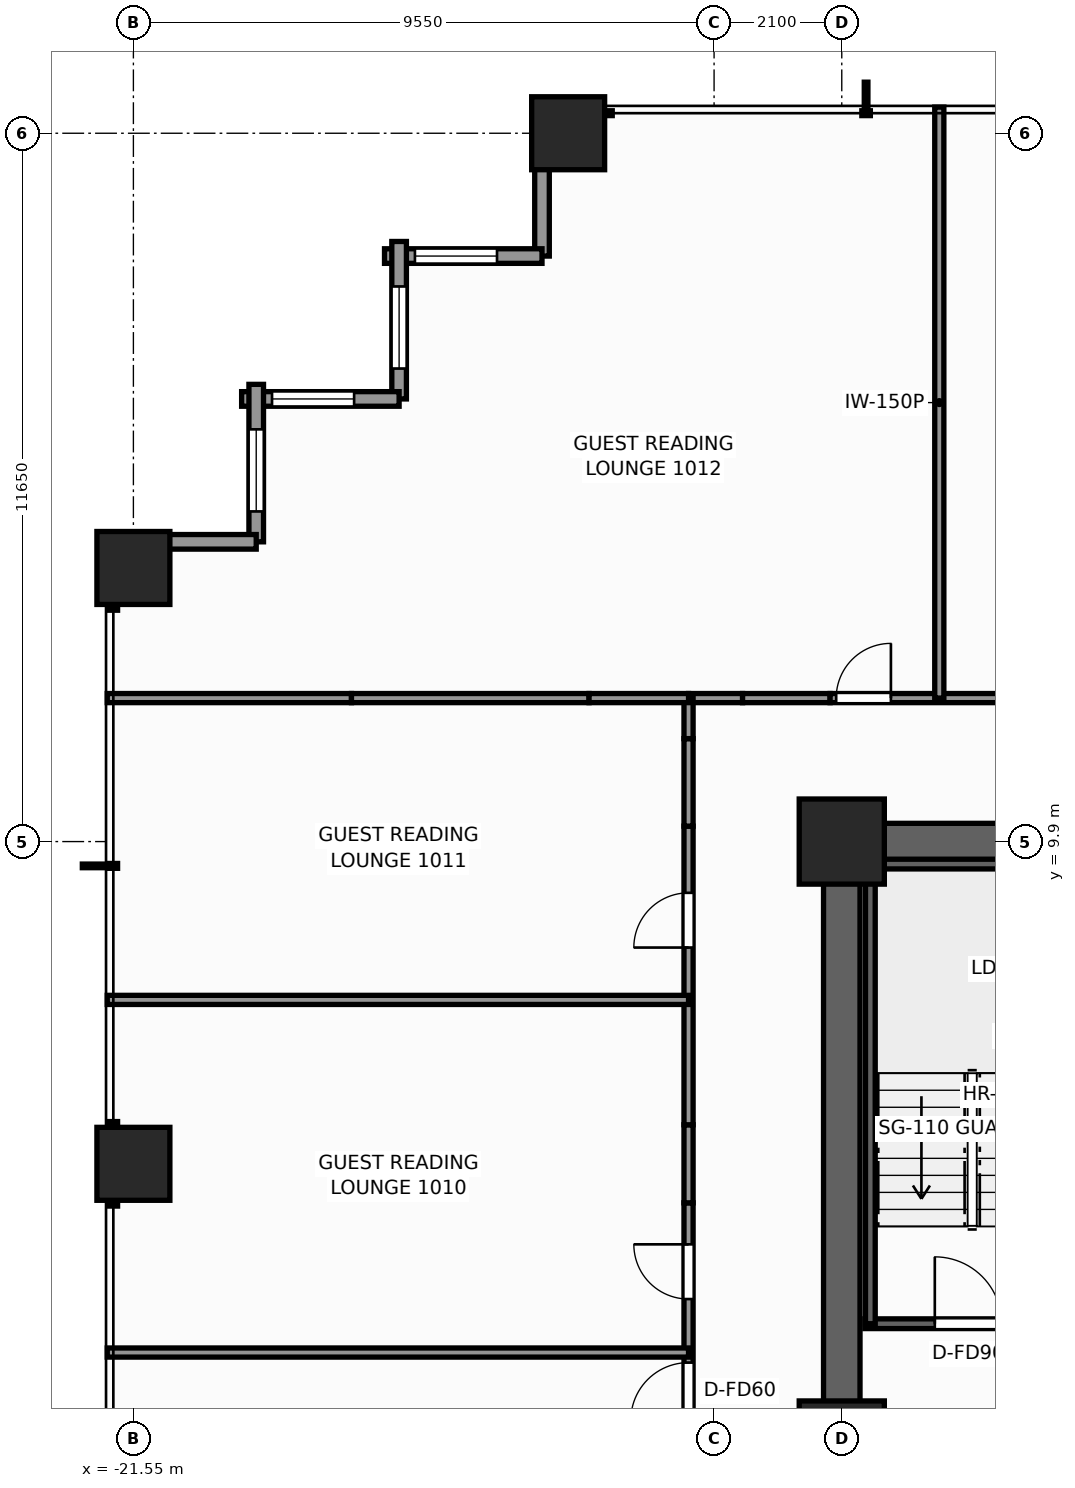
"""IFC4 building model, lengths in metres.
Left out: names, types, materials, properties, quantities, classifications, styles, units other than length and angle.
Written with IfcOpenShell. Run it as: python <this file> out.ifc"""

import sys

from ifc_helpers import new_model, si_unit, direction, frame, frame_2d, origin, origin_2d, place, context, subcontext, project, spatial, rectangle, extrude, element, fill, save


model = new_model("IFC4")
c1 = context("Model", 3, precision=1e-05, world=origin(), true_north=direction((0.0, 1.0)))
c2 = subcontext(c1, "Body", "Model", "MODEL_VIEW")
j1 = project(units=[si_unit("LENGTHUNIT", "METRE"), si_unit("PLANEANGLEUNIT", "RADIAN")], contexts=[c1])
p1 = place(None, origin())
s1 = spatial("IfcSite", under=j1, at=p1, CompositionType="ELEMENT")
p2 = place(p1, origin())
s2 = spatial("IfcBuilding", under=s1, at=p2, CompositionType="ELEMENT")
p3 = place(p2, frame((0.0, 0.0, 37.0)))
s3 = spatial("IfcBuildingStorey", under=s2, at=p3, CompositionType="ELEMENT", Elevation=37.0)
p4 = place(p3, frame((-10.2, 9.9, 0.0), z_axis=(0.0, 0.0, 1.0), x_axis=(1.0, 0.0, 0.0)))
e1 = element("IfcWall", 1, at=p4, inside=s3, PredefinedType="SHEAR", context=c2, shape_type="SweptSolid", body=[
    extrude(rectangle(XDim=14.62, YDim=0.6, at=frame_2d((7.31, 0.0))), origin(), (0.0, 0.0, 1.0), 3.3),
])
p5 = place(p3, frame((-9.9, -3.7, 0.0), z_axis=(0.0, 0.0, 1.0), x_axis=(0.0, 1.0, 0.0)))
e2 = element("IfcWall", 2, at=p5, inside=s3, PredefinedType="SHEAR", context=c2, shape_type="SweptSolid", body=[
    extrude(rectangle(XDim=13.3, YDim=0.6, at=frame_2d((6.65, 0.0))), origin(), (0.0, 0.0, 1.0), 3.3),
])
p6 = place(p5, frame((0.35, 0.0, 0.0)))
e3 = element("IfcOpeningElement", 3, at=p6, cuts=e2, PredefinedType="OPENING", context=c2, shape_type="SweptSolid", body=[
    extrude(rectangle(XDim=1.1, YDim=2.2, at=frame_2d((0.55, 1.1))), frame((0.0, 0.31, 0.0), z_axis=(0.0, -1.0, 0.0), x_axis=(1.0, 0.0, 0.0)), (0.0, 0.0, 1.0), 0.62),
])
for number, where, z_axis, x_axis in (
    (4, (-9.9, 9.9, 0.0), (0.0, 0.0, 1.0), (1.0, 0.0, 0.0)),
    (5, (-9.9, 0.0, 0.0), (0.0, 0.0, 1.0), (1.0, 0.0, 0.0)),
):
    element("IfcColumn", number, at=place(p3, frame(where, z_axis=z_axis, x_axis=x_axis)), inside=s3, PredefinedType="COLUMN", context=c2, shape_type="SweptSolid", body=[
        extrude(rectangle(XDim=1.4, YDim=1.4, at=origin_2d()), origin(), (0.0, 0.0, 1.0), 3.3),
    ])
for number, where, z_axis, x_axis in (
    (6, (-14.4, 21.55, 0.0), (0.0, 0.0, 1.0), (1.0, 0.0, 0.0)),
    (7, (-21.55, 4.6, 0.0), (0.0, 0.0, 1.0), (1.0, 0.0, 0.0)),
    (8, (-21.55, 14.4, 0.0), (0.0, 0.0, 1.0), (1.0, 0.0, 0.0)),
):
    element("IfcColumn", number, at=place(p3, frame(where, z_axis=z_axis, x_axis=x_axis)), inside=s3, PredefinedType="COLUMN", context=c2, shape_type="SweptSolid", body=[
        extrude(rectangle(XDim=1.2, YDim=1.2, at=origin_2d()), origin(), (0.0, 0.0, 1.0), 3.3),
    ])
p7 = place(p3, frame((-14.83, 19.53, 0.0), z_axis=(0.0, 0.0, 1.0), x_axis=(0.0, 1.0, 0.0)))
e9 = element("IfcWall", 9, at=p7, inside=s3, PredefinedType="STANDARD", context=c2, shape_type="SweptSolid", body=[
    extrude(rectangle(XDim=2.59, YDim=0.24, at=frame_2d((1.295, 0.0))), origin(), (0.0, 0.0, 1.0), 1.955),
])
p8 = place(p3, frame((-17.42, 19.53, 0.0), z_axis=(0.0, 0.0, 1.0), x_axis=(1.0, 0.0, 0.0)))
e10 = element("IfcWall", 10, at=p8, inside=s3, PredefinedType="STANDARD", context=c2, shape_type="SweptSolid", body=[
    extrude(rectangle(XDim=2.59, YDim=0.24, at=frame_2d((1.295, 0.0))), origin(), (0.0, 0.0, 1.0), 2.439),
])
p9 = place(p8, frame((0.5, 0.0, 0.65)))
e11 = element("IfcOpeningElement", 11, at=p9, cuts=e10, PredefinedType="OPENING", context=c2, shape_type="SweptSolid", body=[
    extrude(rectangle(XDim=1.35, YDim=1.55, at=frame_2d((0.675, 0.775))), frame((0.0, 0.13, 0.0), z_axis=(0.0, -1.0, 0.0), x_axis=(1.0, 0.0, 0.0)), (0.0, 0.0, 1.0), 0.26),
])
p10 = place(p3, frame((-17.18, 17.18, 0.0), z_axis=(0.0, 0.0, 1.0), x_axis=(0.0, 1.0, 0.0)))
e12 = element("IfcWall", 12, at=p10, inside=s3, PredefinedType="STANDARD", context=c2, shape_type="SweptSolid", body=[
    extrude(rectangle(XDim=2.59, YDim=0.24, at=frame_2d((1.295, 0.0))), origin(), (0.0, 0.0, 1.0), 2.439),
])
p11 = place(p10, frame((0.5, 0.0, 0.65)))
e13 = element("IfcOpeningElement", 13, at=p11, cuts=e12, PredefinedType="OPENING", context=c2, shape_type="SweptSolid", body=[
    extrude(rectangle(XDim=1.35, YDim=1.55, at=frame_2d((0.675, 0.775))), frame((0.0, 0.13, 0.0), z_axis=(0.0, -1.0, 0.0), x_axis=(1.0, 0.0, 0.0)), (0.0, 0.0, 1.0), 0.26),
])
p12 = place(p3, frame((-19.77, 17.18, 0.0), z_axis=(0.0, 0.0, 1.0), x_axis=(1.0, 0.0, 0.0)))
e14 = element("IfcWall", 14, at=p12, inside=s3, PredefinedType="STANDARD", context=c2, shape_type="SweptSolid", body=[
    extrude(rectangle(XDim=2.59, YDim=0.24, at=frame_2d((1.295, 0.0))), origin(), (0.0, 0.0, 1.0), 2.439),
])
p13 = place(p12, frame((0.5, 0.0, 0.65)))
e15 = element("IfcOpeningElement", 15, at=p13, cuts=e14, PredefinedType="OPENING", context=c2, shape_type="SweptSolid", body=[
    extrude(rectangle(XDim=1.35, YDim=1.55, at=frame_2d((0.675, 0.775))), frame((0.0, 0.13, 0.0), z_axis=(0.0, -1.0, 0.0), x_axis=(1.0, 0.0, 0.0)), (0.0, 0.0, 1.0), 0.26),
])
p14 = place(p3, frame((-19.53, 14.83, 0.0), z_axis=(0.0, 0.0, 1.0), x_axis=(0.0, 1.0, 0.0)))
e16 = element("IfcWall", 16, at=p14, inside=s3, PredefinedType="STANDARD", context=c2, shape_type="SweptSolid", body=[
    extrude(rectangle(XDim=2.59, YDim=0.24, at=frame_2d((1.295, 0.0))), origin(), (0.0, 0.0, 1.0), 2.439),
])
p15 = place(p14, frame((0.5, 0.0, 0.65)))
e17 = element("IfcOpeningElement", 17, at=p15, cuts=e16, PredefinedType="OPENING", context=c2, shape_type="SweptSolid", body=[
    extrude(rectangle(XDim=1.35, YDim=1.55, at=frame_2d((0.675, 0.775))), frame((0.0, 0.13, 0.0), z_axis=(0.0, -1.0, 0.0), x_axis=(1.0, 0.0, 0.0)), (0.0, 0.0, 1.0), 0.26),
])
p16 = place(p3, frame((-22.12, 14.83, 0.0), z_axis=(0.0, 0.0, 1.0), x_axis=(1.0, 0.0, 0.0)))
e18 = element("IfcWall", 18, at=p16, inside=s3, PredefinedType="STANDARD", context=c2, shape_type="SweptSolid", body=[
    extrude(rectangle(XDim=2.59, YDim=0.24, at=frame_2d((1.295, 0.0))), origin(), (0.0, 0.0, 1.0), 1.955),
])
p17 = place(p3, frame((-9.52, 1.97, 0.0), z_axis=(0.0, 0.0, 1.0), x_axis=(1.0, 0.0, 0.0)))
e19 = element("IfcWall", 19, at=p17, inside=s3, PredefinedType="SHEAR", context=c2, shape_type="SweptSolid", body=[
    extrude(rectangle(XDim=3.52, YDim=0.16, at=frame_2d((1.76, 0.0))), origin(), (0.0, 0.0, 1.0), 3.3),
])
p18 = place(p17, frame((1.15, 0.0, 0.0)))
e20 = element("IfcOpeningElement", 20, at=p18, cuts=e19, PredefinedType="OPENING", context=c2, shape_type="SweptSolid", body=[
    extrude(rectangle(XDim=1.1, YDim=2.2, at=frame_2d((0.55, 1.1))), frame((0.0, 0.09, 0.0), z_axis=(0.0, -1.0, 0.0), x_axis=(1.0, 0.0, 0.0)), (0.0, 0.0, 1.0), 0.18),
])
p19 = place(p3, frame((-9.52, 9.53, 0.0), z_axis=(0.0, 0.0, 1.0), x_axis=(1.0, 0.0, 0.0)))
e21 = element("IfcWall", 21, at=p19, inside=s3, PredefinedType="SHEAR", context=c2, shape_type="SweptSolid", body=[
    extrude(rectangle(XDim=3.52, YDim=0.16, at=frame_2d((1.76, 0.0))), origin(), (0.0, 0.0, 1.0), 3.3),
])
p20 = place(p3, frame((-9.43, 1.97, 0.0), z_axis=(0.0, 0.0, 1.0), x_axis=(0.0, 1.0, 0.0)))
e22 = element("IfcWall", 22, at=p20, inside=s3, PredefinedType="SHEAR", context=c2, shape_type="SweptSolid", body=[
    extrude(rectangle(XDim=7.56, YDim=0.16, at=frame_2d((3.78, 0.0))), origin(), (0.0, 0.0, 1.0), 3.3),
])
p21 = place(p3, frame((-12.42, 12.26, 0.0), z_axis=(0.0, 0.0, 1.0), x_axis=(1.0, 0.0, 0.0)))
e23 = element("IfcWall", 23, at=p21, inside=s3, PredefinedType="PARTITIONING", context=c2, shape_type="SweptSolid", body=[
    extrude(rectangle(XDim=0.889, YDim=0.15, at=frame_2d((0.444, 0.0))), origin(), (0.0, 0.0, 1.0), 3.06),
])
p22 = place(p3, frame((-11.531, 12.26, 0.0), z_axis=(0.0, 0.0, 1.0), x_axis=(1.0, 0.0, 0.0)))
e24 = element("IfcWall", 24, at=p22, inside=s3, PredefinedType="PARTITIONING", context=c2, shape_type="SweptSolid", body=[
    extrude(rectangle(XDim=1.439, YDim=0.15, at=frame_2d((0.72, 0.0))), origin(), (0.0, 0.0, 1.0), 1.945),
])
p23 = place(p3, frame((-10.092, 12.26, 0.0), z_axis=(0.0, 0.0, 1.0), x_axis=(1.0, 0.0, 0.0)))
e25 = element("IfcWall", 25, at=p23, inside=s3, PredefinedType="PARTITIONING", context=c2, shape_type="SweptSolid", body=[
    extrude(rectangle(XDim=4.85, YDim=0.15, at=frame_2d((2.425, 0.0))), origin(), (0.0, 0.0, 1.0), 3.06),
])
p24 = place(p23, frame((0.1, 0.0, 0.0)))
e26 = element("IfcOpeningElement", 26, at=p24, cuts=e25, PredefinedType="OPENING", context=c2, shape_type="SweptSolid", body=[
    extrude(rectangle(XDim=0.9, YDim=2.06, at=frame_2d((0.45, 1.03))), frame((0.0, 0.085, 0.0), z_axis=(0.0, -1.0, 0.0), x_axis=(1.0, 0.0, 0.0)), (0.0, 0.0, 1.0), 0.17),
])
p25 = place(p23, frame((2.772, 0.0, 0.0)))
e27 = element("IfcOpeningElement", 27, at=p25, cuts=e25, PredefinedType="OPENING", context=c2, shape_type="SweptSolid", body=[
    extrude(rectangle(XDim=0.9, YDim=2.06, at=frame_2d((0.45, 1.03))), frame((0.0, 0.085, 0.0), z_axis=(0.0, -1.0, 0.0), x_axis=(1.0, 0.0, 0.0)), (0.0, 0.0, 1.0), 0.17),
])
p26 = place(p3, frame((-12.42, -3.958, 0.0), z_axis=(0.0, 0.0, 1.0), x_axis=(0.0, 1.0, 0.0)))
e28 = element("IfcWall", 28, at=p26, inside=s3, PredefinedType="PARTITIONING", context=c2, shape_type="SweptSolid", body=[
    extrude(rectangle(XDim=7.916, YDim=0.15, at=frame_2d((3.958, 0.0))), origin(), (0.0, 0.0, 1.0), 2.349),
])
p27 = place(p26, frame((4.339, 0.0, 0.0)))
e29 = element("IfcOpeningElement", 29, at=p27, cuts=e28, PredefinedType="OPENING", context=c2, shape_type="SweptSolid", body=[
    extrude(rectangle(XDim=0.95, YDim=2.06, at=frame_2d((0.475, 1.03))), frame((0.0, 0.085, 0.0), z_axis=(0.0, -1.0, 0.0), x_axis=(1.0, 0.0, 0.0)), (0.0, 0.0, 1.0), 0.17),
])
p28 = place(p26, frame((6.333, 0.0, 0.0)))
e30 = element("IfcOpeningElement", 30, at=p28, cuts=e28, PredefinedType="OPENING", context=c2, shape_type="SweptSolid", body=[
    extrude(rectangle(XDim=0.9, YDim=2.06, at=frame_2d((0.45, 1.03))), frame((0.0, 0.085, 0.0), z_axis=(0.0, -1.0, 0.0), x_axis=(1.0, 0.0, 0.0)), (0.0, 0.0, 1.0), 0.17),
])
p29 = place(p3, frame((-12.42, 3.958, 0.0), z_axis=(0.0, 0.0, 1.0), x_axis=(0.0, 1.0, 0.0)))
e31 = element("IfcWall", 31, at=p29, inside=s3, PredefinedType="PARTITIONING", context=c2, shape_type="SweptSolid", body=[
    extrude(rectangle(XDim=1.284, YDim=0.15, at=frame_2d((0.642, 0.0))), origin(), (0.0, 0.0, 1.0), 1.945),
])
p30 = place(p3, frame((-12.42, 5.242, 0.0), z_axis=(0.0, 0.0, 1.0), x_axis=(0.0, 1.0, 0.0)))
e32 = element("IfcWall", 32, at=p30, inside=s3, PredefinedType="PARTITIONING", context=c2, shape_type="SweptSolid", body=[
    extrude(rectangle(XDim=4.912, YDim=0.15, at=frame_2d((2.456, 0.0))), origin(), (0.0, 0.0, 1.0), 3.06),
])
p31 = place(p30, frame((2.915, 0.0, 0.0)))
e33 = element("IfcOpeningElement", 33, at=p31, cuts=e32, PredefinedType="OPENING", context=c2, shape_type="SweptSolid", body=[
    extrude(rectangle(XDim=0.9, YDim=2.06, at=frame_2d((0.45, 1.03))), frame((0.0, 0.085, 0.0), z_axis=(0.0, -1.0, 0.0), x_axis=(1.0, 0.0, 0.0)), (0.0, 0.0, 1.0), 0.17),
])
p32 = place(p3, frame((-12.42, 10.154, 0.0), z_axis=(0.0, 0.0, 1.0), x_axis=(0.0, 1.0, 0.0)))
e34 = element("IfcWall", 34, at=p32, inside=s3, PredefinedType="PARTITIONING", context=c2, shape_type="SweptSolid", body=[
    extrude(rectangle(XDim=1.439, YDim=0.15, at=frame_2d((0.72, 0.0))), origin(), (0.0, 0.0, 1.0), 1.945),
])
p33 = place(p3, frame((-12.42, 11.593, 0.0), z_axis=(0.0, 0.0, 1.0), x_axis=(0.0, 1.0, 0.0)))
e35 = element("IfcWall", 35, at=p33, inside=s3, PredefinedType="PARTITIONING", context=c2, shape_type="SweptSolid", body=[
    extrude(rectangle(XDim=0.667, YDim=0.15, at=frame_2d((0.333, 0.0))), origin(), (0.0, 0.0, 1.0), 3.06),
])
p34 = place(p3, frame((-21.98, 12.26, 0.0), z_axis=(0.0, 0.0, 1.0), x_axis=(1.0, 0.0, 0.0)))
e36 = element("IfcWall", 36, at=p34, inside=s3, PredefinedType="PARTITIONING", context=c2, shape_type="SweptSolid", body=[
    extrude(rectangle(XDim=4.017, YDim=0.15, at=frame_2d((2.008, 0.0))), origin(), (0.0, 0.0, 1.0), 2.429),
])
p35 = place(p3, frame((-17.963, 12.26, 0.0), z_axis=(0.0, 0.0, 1.0), x_axis=(1.0, 0.0, 0.0)))
e37 = element("IfcWall", 37, at=p35, inside=s3, PredefinedType="PARTITIONING", context=c2, shape_type="SweptSolid", body=[
    extrude(rectangle(XDim=3.907, YDim=0.15, at=frame_2d((1.954, 0.0))), origin(), (0.0, 0.0, 1.0), 1.945),
])
p36 = place(p3, frame((-14.056, 12.26, 0.0), z_axis=(0.0, 0.0, 1.0), x_axis=(1.0, 0.0, 0.0)))
e38 = element("IfcWall", 38, at=p36, inside=s3, PredefinedType="PARTITIONING", context=c2, shape_type="SweptSolid", body=[
    extrude(rectangle(XDim=1.636, YDim=0.15, at=frame_2d((0.818, 0.0))), origin(), (0.0, 0.0, 1.0), 3.06),
])
for number, where, z_axis, x_axis in (
    (39, (-21.98, 1.496, 0.0), (0.0, 0.0, 1.0), (1.0, 0.0, 0.0)),
    (40, (-21.98, 7.296, 0.0), (0.0, 0.0, 1.0), (1.0, 0.0, 0.0)),
):
    element("IfcWall", number, at=place(p3, frame(where, z_axis=z_axis, x_axis=x_axis)), inside=s3, PredefinedType="PARTITIONING", context=c2, shape_type="SweptSolid", body=[
        extrude(rectangle(XDim=9.56, YDim=0.15, at=frame_2d((4.78, 0.0))), origin(), (0.0, 0.0, 1.0), 2.429),
    ])
p37 = place(p3, frame((-8.296, 12.26, 0.0), z_axis=(0.0, 0.0, 1.0), x_axis=(0.0, 1.0, 0.0)))
e41 = element("IfcWall", 41, at=p37, inside=s3, PredefinedType="PARTITIONING", context=c2, shape_type="SweptSolid", body=[
    extrude(rectangle(XDim=9.72, YDim=0.15, at=frame_2d((4.86, 0.0))), origin(), (0.0, 0.0, 1.0), 2.429),
])
p38 = place(p9, origin())
e42 = element("IfcWindow", 42, at=p38, inside=s3, PartitioningType="SINGLE_PANEL", PredefinedType="WINDOW", context=c2, shape_type="SweptSolid", body=[
    extrude(rectangle(XDim=1.35, YDim=1.55, at=frame_2d((0.675, 0.775))), frame((0.0, 0.03, 0.0), z_axis=(0.0, -1.0, 0.0), x_axis=(1.0, 0.0, 0.0)), (0.0, 0.0, 1.0), 0.06),
])
fill(e11, e42)
p39 = place(p11, origin())
e43 = element("IfcWindow", 43, at=p39, inside=s3, PartitioningType="SINGLE_PANEL", PredefinedType="WINDOW", context=c2, shape_type="SweptSolid", body=[
    extrude(rectangle(XDim=1.35, YDim=1.55, at=frame_2d((0.675, 0.775))), frame((0.0, 0.03, 0.0), z_axis=(0.0, -1.0, 0.0), x_axis=(1.0, 0.0, 0.0)), (0.0, 0.0, 1.0), 0.06),
])
fill(e13, e43)
p40 = place(p13, origin())
e44 = element("IfcWindow", 44, at=p40, inside=s3, PartitioningType="SINGLE_PANEL", PredefinedType="WINDOW", context=c2, shape_type="SweptSolid", body=[
    extrude(rectangle(XDim=1.35, YDim=1.55, at=frame_2d((0.675, 0.775))), frame((0.0, 0.03, 0.0), z_axis=(0.0, -1.0, 0.0), x_axis=(1.0, 0.0, 0.0)), (0.0, 0.0, 1.0), 0.06),
])
fill(e15, e44)
p41 = place(p15, origin())
e45 = element("IfcWindow", 45, at=p41, inside=s3, PartitioningType="SINGLE_PANEL", PredefinedType="WINDOW", context=c2, shape_type="SweptSolid", body=[
    extrude(rectangle(XDim=1.35, YDim=1.55, at=frame_2d((0.675, 0.775))), frame((0.0, 0.03, 0.0), z_axis=(0.0, -1.0, 0.0), x_axis=(1.0, 0.0, 0.0)), (0.0, 0.0, 1.0), 0.06),
])
fill(e17, e45)
p42 = place(p18, origin())
e46 = element("IfcDoor", 46, at=p42, inside=s3, OperationType="SINGLE_SWING_LEFT", PredefinedType="DOOR", context=c2, shape_type="SweptSolid", body=[
    extrude(rectangle(XDim=1.1, YDim=2.2, at=frame_2d((0.55, 1.1))), frame((0.0, 0.025, 0.0), z_axis=(0.0, -1.0, 0.0), x_axis=(1.0, 0.0, 0.0)), (0.0, 0.0, 1.0), 0.05),
])
fill(e20, e46)
p43 = place(p27, origin())
e47 = element("IfcDoor", 47, at=p43, inside=s3, OperationType="SINGLE_SWING_LEFT", PredefinedType="DOOR", context=c2, shape_type="SweptSolid", body=[
    extrude(rectangle(XDim=0.95, YDim=2.06, at=frame_2d((0.475, 1.03))), frame((0.0, 0.025, 0.0), z_axis=(0.0, -1.0, 0.0), x_axis=(1.0, 0.0, 0.0)), (0.0, 0.0, 1.0), 0.05),
])
fill(e29, e47)
p44 = place(p28, origin())
e48 = element("IfcDoor", 48, at=p44, inside=s3, OperationType="SINGLE_SWING_RIGHT", PredefinedType="DOOR", context=c2, shape_type="SweptSolid", body=[
    extrude(rectangle(XDim=0.9, YDim=2.06, at=frame_2d((0.45, 1.03))), frame((0.0, 0.025, 0.0), z_axis=(0.0, -1.0, 0.0), x_axis=(1.0, 0.0, 0.0)), (0.0, 0.0, 1.0), 0.05),
])
fill(e30, e48)
p45 = place(p31, origin())
e49 = element("IfcDoor", 49, at=p45, inside=s3, OperationType="SINGLE_SWING_LEFT", PredefinedType="DOOR", context=c2, shape_type="SweptSolid", body=[
    extrude(rectangle(XDim=0.9, YDim=2.06, at=frame_2d((0.45, 1.03))), frame((0.0, 0.025, 0.0), z_axis=(0.0, -1.0, 0.0), x_axis=(1.0, 0.0, 0.0)), (0.0, 0.0, 1.0), 0.05),
])
fill(e33, e49)
p46 = place(p24, origin())
e50 = element("IfcDoor", 50, at=p46, inside=s3, OperationType="SINGLE_SWING_RIGHT", PredefinedType="DOOR", context=c2, shape_type="SweptSolid", body=[
    extrude(rectangle(XDim=0.9, YDim=2.06, at=frame_2d((0.45, 1.03))), frame((0.0, 0.025, 0.0), z_axis=(0.0, -1.0, 0.0), x_axis=(1.0, 0.0, 0.0)), (0.0, 0.0, 1.0), 0.05),
])
fill(e26, e50)
save(model, sys.argv[1])
